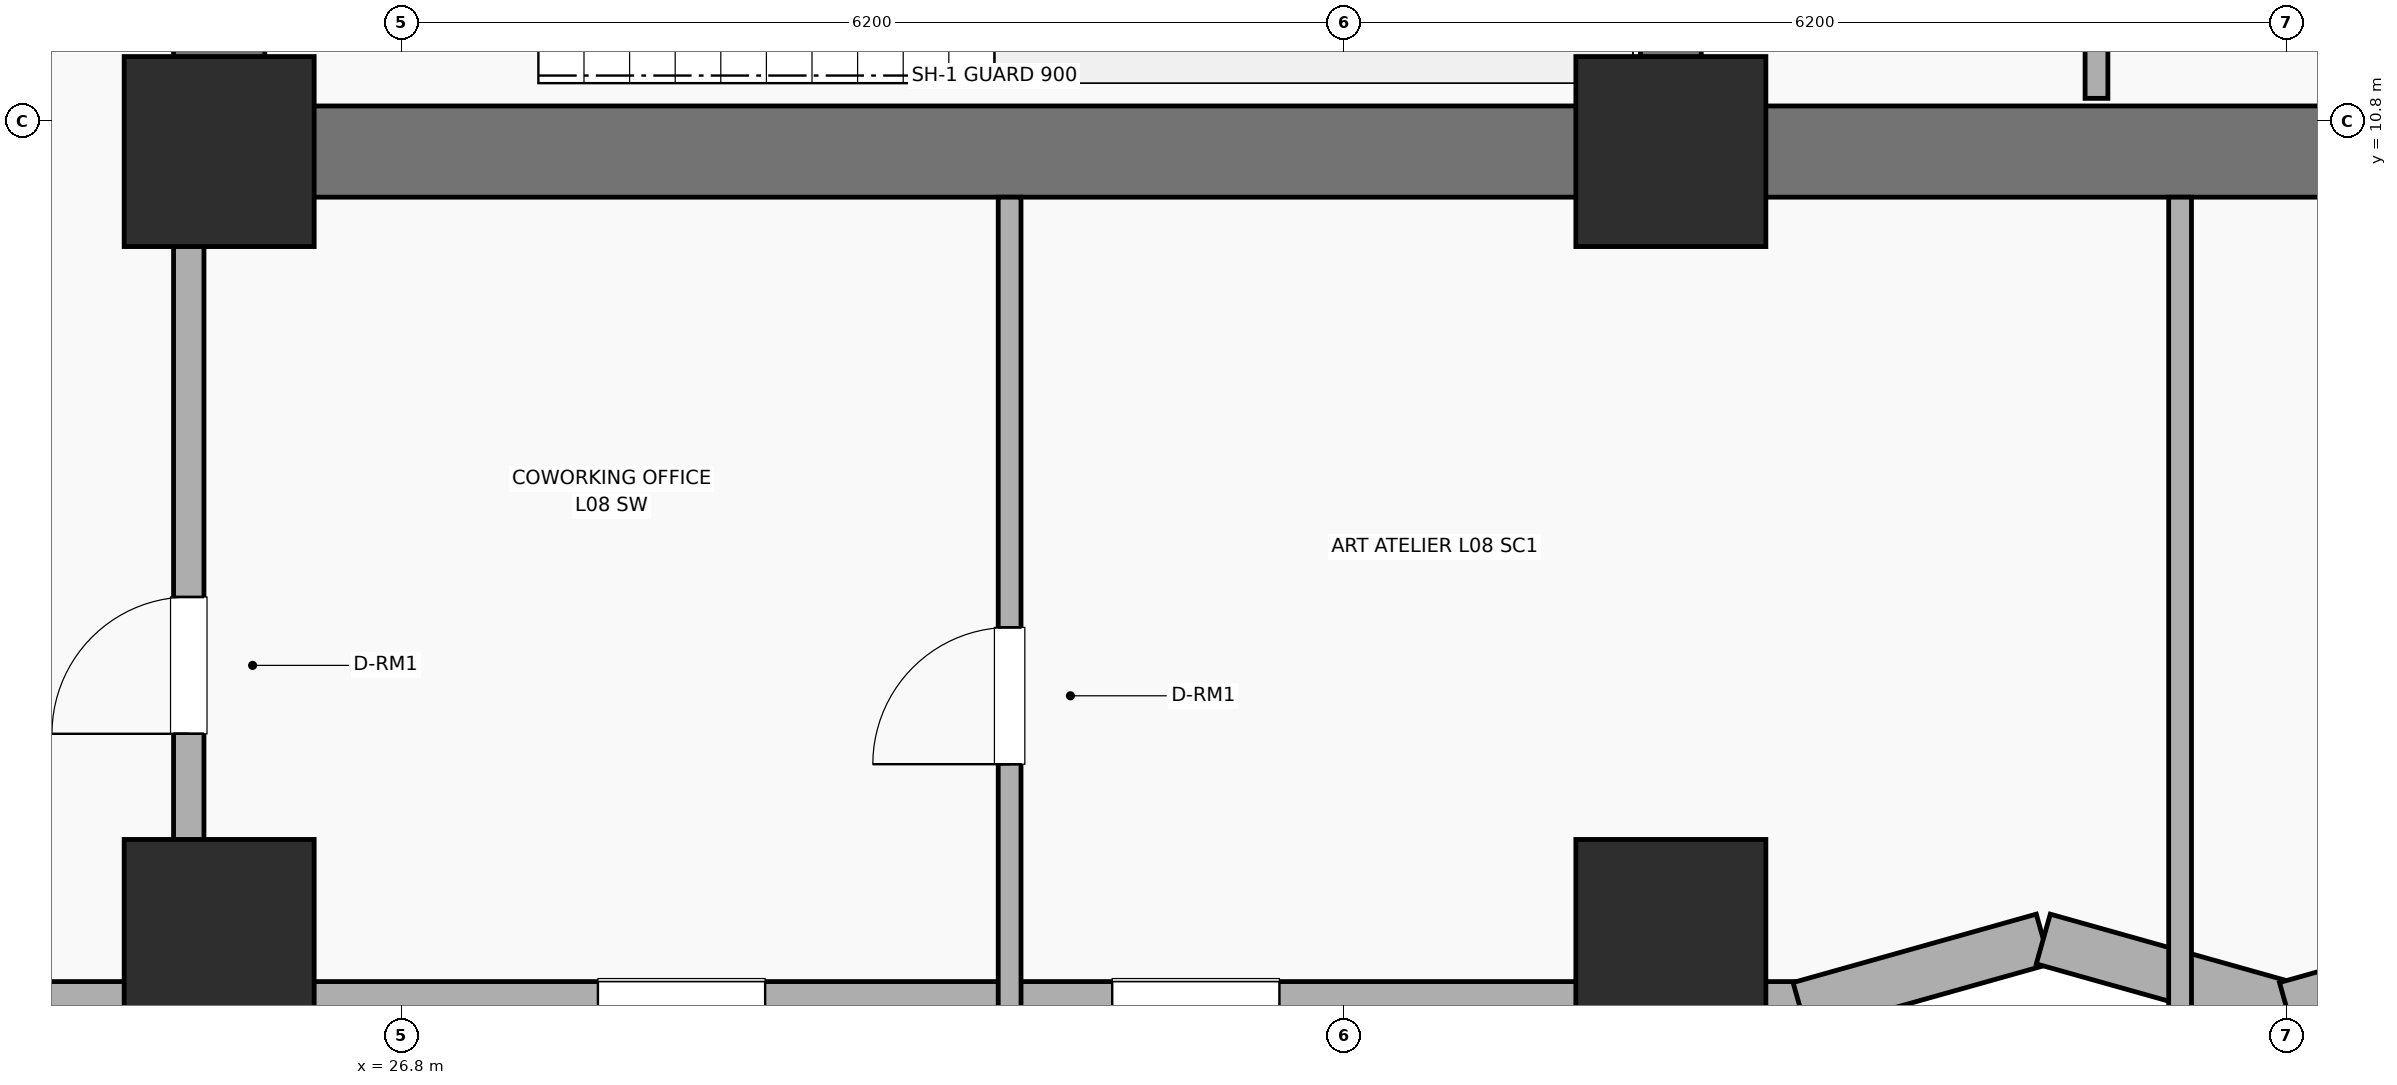
"""IFC4 building model, lengths in metres.
Left out: names, types, materials, properties, quantities, classifications, styles, units other than length and angle.
Written with IfcOpenShell. Run it as: python <this file> out.ifc"""

import sys

from ifc_helpers import new_model, si_unit, direction, frame, frame_2d, origin, origin_2d, place, context, subcontext, project, spatial, rectangle, extrude, element, fill, save


model = new_model("IFC4")
c1 = context("Model", 3, precision=1e-05, world=origin(), true_north=direction((0.0, 1.0)))
c2 = subcontext(c1, "Body", "Model", "MODEL_VIEW")
j1 = project(units=[si_unit("LENGTHUNIT", "METRE"), si_unit("PLANEANGLEUNIT", "RADIAN")], contexts=[c1])
p1 = place(None, origin())
s1 = spatial("IfcSite", under=j1, at=p1, CompositionType="ELEMENT")
p2 = place(p1, origin())
s2 = spatial("IfcBuilding", under=s1, at=p2, CompositionType="ELEMENT")
p3 = place(p2, frame((0.0, 0.0, 36.2)))
s3 = spatial("IfcBuildingStorey", under=s2, at=p3, CompositionType="ELEMENT", Elevation=36.2)
p4 = place(p3, frame((52.8, 10.6, 0.0), z_axis=(0.0, 0.0, 1.0), x_axis=(-1.0, 0.0, 0.0)))
e1 = element("IfcWall", 1, at=p4, inside=s3, PredefinedType="SHEAR", context=c2, shape_type="SweptSolid", body=[
    extrude(rectangle(XDim=27.2, YDim=0.6, at=frame_2d((13.6, 0.0))), origin(), (0.0, 0.0, 1.0), 3.7),
])
p5 = place(p3, frame((25.6, 10.9, 0.0), z_axis=(0.0, 0.0, 1.0), x_axis=(0.0, 1.0, 0.0)))
e2 = element("IfcWall", 2, at=p5, inside=s3, PredefinedType="SHEAR", context=c2, shape_type="SweptSolid", body=[
    extrude(rectangle(XDim=5.6, YDim=0.6, at=frame_2d((2.8, 0.0))), origin(), (0.0, 0.0, 1.0), 3.7),
])
p6 = place(p3, frame((35.15, 10.9, 0.0), z_axis=(0.0, 0.0, 1.0), x_axis=(0.0, 1.0, 0.0)))
e3 = element("IfcWall", 3, at=p6, inside=s3, PredefinedType="SHEAR", context=c2, shape_type="SweptSolid", body=[
    extrude(rectangle(XDim=5.6, YDim=0.4, at=frame_2d((2.8, 0.0))), origin(), (0.0, 0.0, 1.0), 3.7),
])
for number, where, z_axis, x_axis in (
    (4, (25.6, 10.6, 0.0), (0.0, 0.0, 1.0), (1.0, 0.0, 0.0)),
    (5, (35.15, 10.6, 0.0), (0.0, 0.0, 1.0), (1.0, 0.0, 0.0)),
    (6, (25.6, 5.45, 0.0), (0.0, 0.0, 1.0), (1.0, 0.0, 0.0)),
    (7, (35.15, 5.45, 0.0), (0.0, 0.0, 1.0), (1.0, 0.0, 0.0)),
):
    element("IfcColumn", number, at=place(p3, frame(where, z_axis=z_axis, x_axis=x_axis)), inside=s3, PredefinedType="COLUMN", context=c2, shape_type="SweptSolid", body=[
        extrude(rectangle(XDim=1.25, YDim=1.25, at=origin_2d()), origin(), (0.0, 0.0, 1.0), 3.7),
    ])
p7 = place(p3, frame((18.6, 4.97, 0.0), z_axis=(0.0, 0.0, 1.0), x_axis=(1.0, 0.0, 0.0)))
e8 = element("IfcWall", 8, at=p7, inside=s3, PredefinedType="SOLIDWALL", context=c2, shape_type="SweptSolid", body=[
    extrude(rectangle(XDim=17.4, YDim=0.34, at=frame_2d((8.7, 0.0))), origin(), (0.0, 0.0, 1.0), 2.7),
])
p8 = place(p7, frame((1.442, 0.0, 0.93)))
e9 = element("IfcOpeningElement", 9, at=p8, cuts=e8, PredefinedType="OPENING", context=c2, shape_type="SweptSolid", body=[
    extrude(rectangle(XDim=1.1, YDim=1.65, at=frame_2d((0.55, 0.825))), frame((0.0, 0.18, 0.0), z_axis=(0.0, -1.0, 0.0), x_axis=(1.0, 0.0, 0.0)), (0.0, 0.0, 1.0), 0.36),
])
p9 = place(p7, frame((3.075, 0.0, 0.93)))
e10 = element("IfcOpeningElement", 10, at=p9, cuts=e8, PredefinedType="OPENING", context=c2, shape_type="SweptSolid", body=[
    extrude(rectangle(XDim=1.1, YDim=1.65, at=frame_2d((0.55, 0.825))), frame((0.0, 0.18, 0.0), z_axis=(0.0, -1.0, 0.0), x_axis=(1.0, 0.0, 0.0)), (0.0, 0.0, 1.0), 0.36),
])
p10 = place(p7, frame((9.492, 0.0, 0.93)))
e11 = element("IfcOpeningElement", 11, at=p10, cuts=e8, PredefinedType="OPENING", context=c2, shape_type="SweptSolid", body=[
    extrude(rectangle(XDim=1.1, YDim=1.65, at=frame_2d((0.55, 0.825))), frame((0.0, 0.18, 0.0), z_axis=(0.0, -1.0, 0.0), x_axis=(1.0, 0.0, 0.0)), (0.0, 0.0, 1.0), 0.36),
])
p11 = place(p7, frame((12.875, 0.0, 0.93)))
e12 = element("IfcOpeningElement", 12, at=p11, cuts=e8, PredefinedType="OPENING", context=c2, shape_type="SweptSolid", body=[
    extrude(rectangle(XDim=1.1, YDim=1.65, at=frame_2d((0.55, 0.825))), frame((0.0, 0.18, 0.0), z_axis=(0.0, -1.0, 0.0), x_axis=(1.0, 0.0, 0.0)), (0.0, 0.0, 1.0), 0.36),
])
p12 = place(p3, frame((36.0, 4.97, 0.0), z_axis=(0.0, 0.0, 1.0), x_axis=(0.962662902433, 0.270703040766, 0.0)))
e13 = element("IfcWall", 13, at=p12, inside=s3, PredefinedType="SOLIDWALL", context=c2, shape_type="SweptSolid", body=[
    extrude(rectangle(XDim=1.662, YDim=0.34, at=frame_2d((0.831, 0.0))), origin(), (0.0, 0.0, 1.0), 2.7),
])
p13 = place(p3, frame((37.6, 5.42, 0.0), z_axis=(0.0, 0.0, 1.0), x_axis=(0.962652136636, -0.270741322725, 0.0)))
e14 = element("IfcWall", 14, at=p13, inside=s3, PredefinedType="SOLIDWALL", context=c2, shape_type="SweptSolid", body=[
    extrude(rectangle(XDim=1.662, YDim=0.34, at=frame_2d((0.831, 0.0))), origin(), (0.0, 0.0, 1.0), 2.7),
])
p14 = place(p3, frame((39.2, 4.97, 0.0), z_axis=(0.0, 0.0, 1.0), x_axis=(0.962662902433, 0.270703040766, 0.0)))
e15 = element("IfcWall", 15, at=p14, inside=s3, PredefinedType="SOLIDWALL", context=c2, shape_type="SweptSolid", body=[
    extrude(rectangle(XDim=1.662, YDim=0.34, at=frame_2d((0.831, 0.0))), origin(), (0.0, 0.0, 1.0), 2.7),
])
p15 = place(p3, frame((37.95, 10.95, 0.0), z_axis=(0.0, 0.0, 1.0), x_axis=(0.0, 1.0, 0.0)))
e16 = element("IfcWall", 16, at=p15, inside=s3, PredefinedType="PARTITIONING", context=c2, shape_type="SweptSolid", body=[
    extrude(rectangle(XDim=2.75, YDim=0.15, at=frame_2d((1.375, 0.0))), origin(), (0.0, 0.0, 1.0), 2.53),
])
p16 = place(p3, frame((30.8, 4.97, 0.0), z_axis=(0.0, 0.0, 1.0), x_axis=(0.0, 1.0, 0.0)))
e17 = element("IfcWall", 17, at=p16, inside=s3, PredefinedType="PARTITIONING", context=c2, shape_type="SweptSolid", body=[
    extrude(rectangle(XDim=5.33, YDim=0.15, at=frame_2d((2.665, 0.0))), origin(), (0.0, 0.0, 1.0), 2.53),
])
p17 = place(p16, frame((1.6, 0.0, 0.0)))
e18 = element("IfcOpeningElement", 18, at=p17, cuts=e17, PredefinedType="OPENING", context=c2, shape_type="SweptSolid", body=[
    extrude(rectangle(XDim=0.9, YDim=2.1, at=frame_2d((0.45, 1.05))), frame((0.0, 0.085, 0.0), z_axis=(0.0, -1.0, 0.0), x_axis=(1.0, 0.0, 0.0)), (0.0, 0.0, 1.0), 0.17),
])
p18 = place(p3, frame((38.5, 4.97, 0.0), z_axis=(0.0, 0.0, 1.0), x_axis=(0.0, 1.0, 0.0)))
e19 = element("IfcWall", 19, at=p18, inside=s3, PredefinedType="PARTITIONING", context=c2, shape_type="SweptSolid", body=[
    extrude(rectangle(XDim=5.33, YDim=0.15, at=frame_2d((2.665, 0.0))), origin(), (0.0, 0.0, 1.0), 2.53),
])
p19 = place(p3, frame((25.4, 5.92, 0.0), z_axis=(0.0, 0.0, 1.0), x_axis=(0.0, 1.0, 0.0)))
e20 = element("IfcWall", 20, at=p19, inside=s3, PredefinedType="PARTITIONING", context=c2, shape_type="SweptSolid", body=[
    extrude(rectangle(XDim=4.38, YDim=0.2, at=frame_2d((2.19, 0.0))), origin(), (0.0, 0.0, 1.0), 2.53),
])
p20 = place(p19, frame((0.85, 0.0, 0.0)))
e21 = element("IfcOpeningElement", 21, at=p20, cuts=e20, PredefinedType="OPENING", context=c2, shape_type="SweptSolid", body=[
    extrude(rectangle(XDim=0.9, YDim=2.1, at=frame_2d((0.45, 1.05))), frame((0.0, 0.11, 0.0), z_axis=(0.0, -1.0, 0.0), x_axis=(1.0, 0.0, 0.0)), (0.0, 0.0, 1.0), 0.22),
])
p21 = place(p10, origin())
e22 = element("IfcWindow", 22, at=p21, inside=s3, PartitioningType="SINGLE_PANEL", PredefinedType="WINDOW", context=c2, shape_type="SweptSolid", body=[
    extrude(rectangle(XDim=1.1, YDim=1.65, at=frame_2d((0.55, 0.825))), frame((0.0, 0.03, 0.0), z_axis=(0.0, -1.0, 0.0), x_axis=(1.0, 0.0, 0.0)), (0.0, 0.0, 1.0), 0.06),
])
fill(e11, e22)
p22 = place(p11, origin())
e23 = element("IfcWindow", 23, at=p22, inside=s3, PartitioningType="SINGLE_PANEL", PredefinedType="WINDOW", context=c2, shape_type="SweptSolid", body=[
    extrude(rectangle(XDim=1.1, YDim=1.65, at=frame_2d((0.55, 0.825))), frame((0.0, 0.03, 0.0), z_axis=(0.0, -1.0, 0.0), x_axis=(1.0, 0.0, 0.0)), (0.0, 0.0, 1.0), 0.06),
])
fill(e12, e23)
p23 = place(p17, origin())
e24 = element("IfcDoor", 24, at=p23, inside=s3, OperationType="SINGLE_SWING_LEFT", PredefinedType="DOOR", context=c2, shape_type="SweptSolid", body=[
    extrude(rectangle(XDim=0.9, YDim=2.1, at=frame_2d((0.45, 1.05))), frame((0.0, 0.025, 0.0), z_axis=(0.0, -1.0, 0.0), x_axis=(1.0, 0.0, 0.0)), (0.0, 0.0, 1.0), 0.05),
])
fill(e18, e24)
p24 = place(p20, origin())
e25 = element("IfcDoor", 25, at=p24, inside=s3, OperationType="SINGLE_SWING_LEFT", PredefinedType="DOOR", context=c2, shape_type="SweptSolid", body=[
    extrude(rectangle(XDim=0.9, YDim=2.1, at=frame_2d((0.45, 1.05))), frame((0.0, 0.025, 0.0), z_axis=(0.0, -1.0, 0.0), x_axis=(1.0, 0.0, 0.0)), (0.0, 0.0, 1.0), 0.05),
])
fill(e21, e25)
save(model, sys.argv[1])
